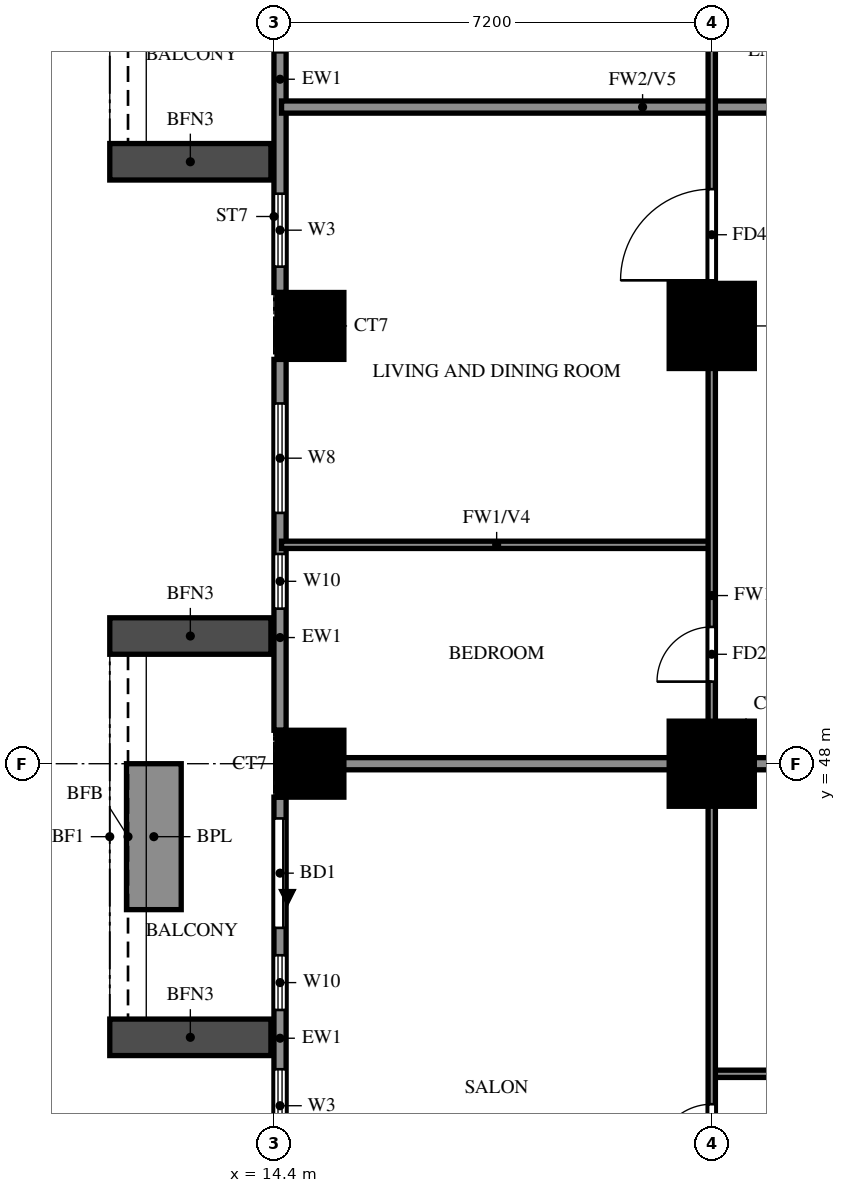
"""IFC4 building model, lengths in metres.
Left out: names, types, materials, properties, quantities, classifications, styles, units other than length and angle.
Written with IfcOpenShell. Run it as: python <this file> out.ifc"""

import sys

from ifc_helpers import new_model, si_unit, direction, frame, frame_2d, origin, origin_2d, place, context, subcontext, project, spatial, rectangle, extrude, source, transform, mapped, element, fill, save


model = new_model("IFC4")
c1 = context("Model", 3, precision=1e-05, world=origin(), true_north=direction((0.0, 1.0)))
c2 = subcontext(c1, "Body", "Model", "MODEL_VIEW")
j1 = project(units=[si_unit("LENGTHUNIT", "METRE"), si_unit("PLANEANGLEUNIT", "RADIAN")], contexts=[c1])
p1 = place(None, origin())
s1 = spatial("IfcSite", under=j1, at=p1, CompositionType="ELEMENT")
p2 = place(p1, origin())
s2 = spatial("IfcBuilding", under=s1, at=p2, CompositionType="ELEMENT")
p3 = place(p2, frame((0.0, 0.0, 44.5)))
s3 = spatial("IfcBuildingStorey", under=s2, at=p3, CompositionType="ELEMENT", Elevation=44.5)
m1 = source(origin(), c2, "Body", "SweptSolid", [
    extrude(rectangle(XDim=1.1, YDim=1.1, at=origin_2d()), origin(), (0.0, 0.0, 1.0), 3.18),
])
p4 = place(p3, frame((15.0, 48.0, 0.0), z_axis=(0.0, 0.0, 1.0), x_axis=(1.0, 0.0, 0.0)))
e1 = element("IfcColumn", 1, at=p4, inside=s3, PredefinedType="COLUMN", context=c2, shape_type="MappedRepresentation", body=[
    mapped(m1, transform((0.0, 0.0, 0.0))),
])
m2 = source(origin(), c2, "Body", "SweptSolid", [
    extrude(rectangle(XDim=1.4, YDim=1.4, at=origin_2d()), origin(), (0.0, 0.0, 1.0), 3.18),
])
p5 = place(p3, frame((21.6, 48.0, 0.0), z_axis=(0.0, 0.0, 1.0), x_axis=(1.0, 0.0, 0.0)))
e2 = element("IfcColumn", 2, at=p5, inside=s3, PredefinedType="COLUMN", context=c2, shape_type="MappedRepresentation", body=[
    mapped(m2, transform((0.0, 0.0, 0.0))),
])
p6 = place(p3, frame((15.0, 55.2, 0.0), z_axis=(0.0, 0.0, 1.0), x_axis=(1.0, 0.0, 0.0)))
e3 = element("IfcColumn", 3, at=p6, inside=s3, PredefinedType="COLUMN", context=c2, shape_type="MappedRepresentation", body=[
    mapped(m1, transform((0.0, 0.0, 0.0))),
])
p7 = place(p3, frame((21.6, 55.2, 0.0), z_axis=(0.0, 0.0, 1.0), x_axis=(1.0, 0.0, 0.0)))
e4 = element("IfcColumn", 4, at=p7, inside=s3, PredefinedType="COLUMN", context=c2, shape_type="MappedRepresentation", body=[
    mapped(m2, transform((0.0, 0.0, 0.0))),
])
p8 = place(p3, frame((14.5, 61.85, 0.0), z_axis=(0.0, 0.0, 1.0), x_axis=(0.0, -1.0, 0.0)))
e5 = element("IfcWall", 5, at=p8, inside=s3, PredefinedType="SOLIDWALL", context=c2, shape_type="SweptSolid", body=[
    extrude(rectangle(XDim=6.1, YDim=0.2, at=frame_2d((3.05, 0.0))), origin(), (0.0, 0.0, 1.0), 3.18),
])
p9 = place(p8, frame((0.35, 0.0, 0.0)))
e6 = element("IfcOpeningElement", 6, at=p9, cuts=e5, PredefinedType="OPENING", context=c2, shape_type="SweptSolid", body=[
    extrude(rectangle(XDim=1.8, YDim=2.4, at=frame_2d((0.9, 1.2))), frame((0.0, 0.11, 0.0), z_axis=(0.0, -1.0, 0.0), x_axis=(1.0, 0.0, 0.0)), (0.0, 0.0, 1.0), 0.22),
])
p10 = place(p8, frame((4.475, 0.0, 0.6)))
e7 = element("IfcOpeningElement", 7, at=p10, cuts=e5, PredefinedType="OPENING", context=c2, shape_type="SweptSolid", body=[
    extrude(rectangle(XDim=1.2, YDim=2.4, at=frame_2d((0.6, 1.2))), frame((0.0, 0.11, 0.0), z_axis=(0.0, -1.0, 0.0), x_axis=(1.0, 0.0, 0.0)), (0.0, 0.0, 1.0), 0.22),
])
p11 = place(p3, frame((14.5, 54.65, 0.0), z_axis=(0.0, 0.0, 1.0), x_axis=(0.0, -1.0, 0.0)))
e8 = element("IfcWall", 8, at=p11, inside=s3, PredefinedType="SOLIDWALL", context=c2, shape_type="SweptSolid", body=[
    extrude(rectangle(XDim=6.1, YDim=0.2, at=frame_2d((3.05, 0.0))), origin(), (0.0, 0.0, 1.0), 3.18),
])
p12 = place(p11, frame((3.2, 0.0, 0.6)))
e9 = element("IfcOpeningElement", 9, at=p12, cuts=e8, PredefinedType="OPENING", context=c2, shape_type="SweptSolid", body=[
    extrude(rectangle(XDim=0.9, YDim=2.4, at=frame_2d((0.45, 1.2))), frame((0.0, 0.11, 0.0), z_axis=(0.0, -1.0, 0.0), x_axis=(1.0, 0.0, 0.0)), (0.0, 0.0, 1.0), 0.22),
])
p13 = place(p11, frame((0.725, 0.0, 0.6)))
e10 = element("IfcOpeningElement", 10, at=p13, cuts=e8, PredefinedType="OPENING", context=c2, shape_type="SweptSolid", body=[
    extrude(rectangle(XDim=1.8, YDim=2.4, at=frame_2d((0.9, 1.2))), frame((0.0, 0.11, 0.0), z_axis=(0.0, -1.0, 0.0), x_axis=(1.0, 0.0, 0.0)), (0.0, 0.0, 1.0), 0.22),
])
p14 = place(p3, frame((14.5, 47.45, 0.0), z_axis=(0.0, 0.0, 1.0), x_axis=(0.0, -1.0, 0.0)))
e11 = element("IfcWall", 11, at=p14, inside=s3, PredefinedType="SOLIDWALL", context=c2, shape_type="SweptSolid", body=[
    extrude(rectangle(XDim=6.1, YDim=0.2, at=frame_2d((3.05, 0.0))), origin(), (0.0, 0.0, 1.0), 3.18),
])
p15 = place(p14, frame((0.35, 0.0, 0.0)))
e12 = element("IfcOpeningElement", 12, at=p15, cuts=e11, PredefinedType="OPENING", context=c2, shape_type="SweptSolid", body=[
    extrude(rectangle(XDim=1.8, YDim=2.4, at=frame_2d((0.9, 1.2))), frame((0.0, 0.11, 0.0), z_axis=(0.0, -1.0, 0.0), x_axis=(1.0, 0.0, 0.0)), (0.0, 0.0, 1.0), 0.22),
])
p16 = place(p14, frame((2.6, 0.0, 0.6)))
e13 = element("IfcOpeningElement", 13, at=p16, cuts=e11, PredefinedType="OPENING", context=c2, shape_type="SweptSolid", body=[
    extrude(rectangle(XDim=0.9, YDim=2.4, at=frame_2d((0.45, 1.2))), frame((0.0, 0.11, 0.0), z_axis=(0.0, -1.0, 0.0), x_axis=(1.0, 0.0, 0.0)), (0.0, 0.0, 1.0), 0.22),
])
p17 = place(p14, frame((4.475, 0.0, 0.6)))
e14 = element("IfcOpeningElement", 14, at=p17, cuts=e11, PredefinedType="OPENING", context=c2, shape_type="SweptSolid", body=[
    extrude(rectangle(XDim=1.2, YDim=2.4, at=frame_2d((0.6, 1.2))), frame((0.0, 0.11, 0.0), z_axis=(0.0, -1.0, 0.0), x_axis=(1.0, 0.0, 0.0)), (0.0, 0.0, 1.0), 0.22),
])
for number, where, z_axis, x_axis in (
    (15, (14.35, 57.9, 0.0), (0.0, 0.0, 1.0), (-1.0, 0.0, 0.0)),
    (16, (14.35, 50.1, 0.0), (0.0, 0.0, 1.0), (-1.0, 0.0, 0.0)),
    (17, (14.35, 43.5, 0.0), (0.0, 0.0, 1.0), (-1.0, 0.0, 0.0)),
):
    element("IfcWall", number, at=place(p3, frame(where, z_axis=z_axis, x_axis=x_axis)), inside=s3, PredefinedType="SOLIDWALL", context=c2, shape_type="SweptSolid", body=[
        extrude(rectangle(XDim=2.65, YDim=0.6, at=frame_2d((1.325, 0.0))), origin(), (0.0, 0.0, 1.0), 2.85),
    ])
p18 = place(p3, frame((12.425, 48.0, 0.0), z_axis=(0.0, 0.0, 1.0), x_axis=(0.0, -1.0, 0.0)))
e18 = element("IfcWall", 18, at=p18, inside=s3, PredefinedType="SOLIDWALL", context=c2, shape_type="SweptSolid", body=[
    extrude(rectangle(XDim=2.4, YDim=0.9, at=frame_2d((1.2, 0.0))), origin(), (0.0, 0.0, 1.0), 0.9),
])
p19 = place(p3, frame((14.525, 48.0, 0.0), z_axis=(0.0, 0.0, 1.0), x_axis=(1.0, 0.0, 0.0)))
e19 = element("IfcWall", 19, at=p19, inside=s3, PredefinedType="SOLIDWALL", context=c2, shape_type="SweptSolid", body=[
    extrude(rectangle(XDim=19.075, YDim=0.2, at=frame_2d((9.538, 0.0))), origin(), (0.0, 0.0, 1.0), 3.18),
])
p20 = place(p3, frame((14.525, 58.8, 0.0), z_axis=(0.0, 0.0, 1.0), x_axis=(1.0, 0.0, 0.0)))
e20 = element("IfcWall", 20, at=p20, inside=s3, PredefinedType="SOLIDWALL", context=c2, shape_type="SweptSolid", body=[
    extrude(rectangle(XDim=11.875, YDim=0.2, at=frame_2d((5.938, 0.0))), origin(), (0.0, 0.0, 1.0), 2.28),
])
p21 = place(p3, frame((21.6, 42.9, 0.0), z_axis=(0.0, 0.0, 1.0), x_axis=(1.0, 0.0, 0.0)))
e21 = element("IfcWall", 21, at=p21, inside=s3, PredefinedType="PARTITIONING", context=c2, shape_type="SweptSolid", body=[
    extrude(rectangle(XDim=14.4, YDim=0.12, at=frame_2d((7.2, 0.0))), origin(), (0.0, 0.0, 1.0), 3.18),
])
p22 = place(p21, frame((2.1, 0.0, 0.0)))
e22 = element("IfcOpeningElement", 22, at=p22, cuts=e21, PredefinedType="OPENING", context=c2, shape_type="SweptSolid", body=[
    extrude(rectangle(XDim=0.9, YDim=2.1, at=frame_2d((0.45, 1.05))), frame((0.0, 0.07, 0.0), z_axis=(0.0, -1.0, 0.0), x_axis=(1.0, 0.0, 0.0)), (0.0, 0.0, 1.0), 0.14),
])
p23 = place(p21, frame((5.85, 0.0, 0.0)))
e23 = element("IfcOpeningElement", 23, at=p23, cuts=e21, PredefinedType="OPENING", context=c2, shape_type="SweptSolid", body=[
    extrude(rectangle(XDim=0.8, YDim=2.1, at=frame_2d((0.4, 1.05))), frame((0.0, 0.07, 0.0), z_axis=(0.0, -1.0, 0.0), x_axis=(1.0, 0.0, 0.0)), (0.0, 0.0, 1.0), 0.14),
])
p24 = place(p21, frame((9.25, 0.0, 0.0)))
e24 = element("IfcOpeningElement", 24, at=p24, cuts=e21, PredefinedType="OPENING", context=c2, shape_type="SweptSolid", body=[
    extrude(rectangle(XDim=0.9, YDim=2.1, at=frame_2d((0.45, 1.05))), frame((0.0, 0.07, 0.0), z_axis=(0.0, -1.0, 0.0), x_axis=(1.0, 0.0, 0.0)), (0.0, 0.0, 1.0), 0.14),
])
p25 = place(p3, frame((14.525, 51.6, 0.0), z_axis=(0.0, 0.0, 1.0), x_axis=(1.0, 0.0, 0.0)))
e25 = element("IfcWall", 25, at=p25, inside=s3, PredefinedType="PARTITIONING", context=c2, shape_type="SweptSolid", body=[
    extrude(rectangle(XDim=7.075, YDim=0.12, at=frame_2d((3.538, 0.0))), origin(), (0.0, 0.0, 1.0), 2.28),
])
p26 = place(p3, frame((21.6, 33.725, 0.0), z_axis=(0.0, 0.0, 1.0), x_axis=(0.0, 1.0, 0.0)))
e26 = element("IfcWall", 26, at=p26, inside=s3, PredefinedType="PARTITIONING", context=c2, shape_type="SweptSolid", body=[
    extrude(rectangle(XDim=35.875, YDim=0.12, at=frame_2d((17.938, 0.0))), origin(), (0.0, 0.0, 1.0), 3.18),
])
p27 = place(p26, frame((7.775, 0.0, 0.0)))
e27 = element("IfcOpeningElement", 27, at=p27, cuts=e26, PredefinedType="OPENING", context=c2, shape_type="SweptSolid", body=[
    extrude(rectangle(XDim=0.9, YDim=2.1, at=frame_2d((0.45, 1.05))), frame((0.0, 0.07, 0.0), z_axis=(0.0, -1.0, 0.0), x_axis=(1.0, 0.0, 0.0)), (0.0, 0.0, 1.0), 0.14),
])
p28 = place(p26, frame((15.625, 0.0, 0.0)))
e28 = element("IfcOpeningElement", 28, at=p28, cuts=e26, PredefinedType="OPENING", context=c2, shape_type="SweptSolid", body=[
    extrude(rectangle(XDim=0.9, YDim=2.1, at=frame_2d((0.45, 1.05))), frame((0.0, 0.07, 0.0), z_axis=(0.0, -1.0, 0.0), x_axis=(1.0, 0.0, 0.0)), (0.0, 0.0, 1.0), 0.14),
])
p29 = place(p26, frame((22.225, 0.0, 0.0)))
e29 = element("IfcOpeningElement", 29, at=p29, cuts=e26, PredefinedType="OPENING", context=c2, shape_type="SweptSolid", body=[
    extrude(rectangle(XDim=1.5, YDim=2.1, at=frame_2d((0.75, 1.05))), frame((0.0, 0.07, 0.0), z_axis=(0.0, -1.0, 0.0), x_axis=(1.0, 0.0, 0.0)), (0.0, 0.0, 1.0), 0.14),
])
p30 = place(p26, frame((26.425, 0.0, 0.0)))
e30 = element("IfcOpeningElement", 30, at=p30, cuts=e26, PredefinedType="OPENING", context=c2, shape_type="SweptSolid", body=[
    extrude(rectangle(XDim=0.9, YDim=2.1, at=frame_2d((0.45, 1.05))), frame((0.0, 0.07, 0.0), z_axis=(0.0, -1.0, 0.0), x_axis=(1.0, 0.0, 0.0)), (0.0, 0.0, 1.0), 0.14),
])
p31 = place(p26, frame((31.825, 0.0, 0.0)))
e31 = element("IfcOpeningElement", 31, at=p31, cuts=e26, PredefinedType="OPENING", context=c2, shape_type="SweptSolid", body=[
    extrude(rectangle(XDim=0.9, YDim=2.1, at=frame_2d((0.45, 1.05))), frame((0.0, 0.07, 0.0), z_axis=(0.0, -1.0, 0.0), x_axis=(1.0, 0.0, 0.0)), (0.0, 0.0, 1.0), 0.14),
])
p32 = place(p10, origin())
e32 = element("IfcWindow", 32, at=p32, inside=s3, PartitioningType="SINGLE_PANEL", PredefinedType="WINDOW", context=c2, shape_type="SweptSolid", body=[
    extrude(rectangle(XDim=1.2, YDim=2.4, at=frame_2d((0.6, 1.2))), frame((0.0, 0.03, 0.0), z_axis=(0.0, -1.0, 0.0), x_axis=(1.0, 0.0, 0.0)), (0.0, 0.0, 1.0), 0.06),
])
fill(e7, e32)
p33 = place(p12, origin())
e33 = element("IfcWindow", 33, at=p33, inside=s3, PartitioningType="SINGLE_PANEL", PredefinedType="WINDOW", context=c2, shape_type="SweptSolid", body=[
    extrude(rectangle(XDim=0.9, YDim=2.4, at=frame_2d((0.45, 1.2))), frame((0.0, 0.03, 0.0), z_axis=(0.0, -1.0, 0.0), x_axis=(1.0, 0.0, 0.0)), (0.0, 0.0, 1.0), 0.06),
])
fill(e9, e33)
p34 = place(p13, origin())
e34 = element("IfcWindow", 34, at=p34, inside=s3, PartitioningType="DOUBLE_PANEL_VERTICAL", PredefinedType="WINDOW", context=c2, shape_type="SweptSolid", body=[
    extrude(rectangle(XDim=1.8, YDim=2.4, at=frame_2d((0.9, 1.2))), frame((0.0, 0.03, 0.0), z_axis=(0.0, -1.0, 0.0), x_axis=(1.0, 0.0, 0.0)), (0.0, 0.0, 1.0), 0.06),
])
fill(e10, e34)
p35 = place(p15, origin())
e35 = element("IfcDoor", 35, at=p35, inside=s3, OperationType="DOUBLE_DOOR_SLIDING", PredefinedType="DOOR", context=c2, shape_type="SweptSolid", body=[
    extrude(rectangle(XDim=1.8, YDim=2.4, at=frame_2d((0.9, 1.2))), frame((0.0, 0.025, 0.0), z_axis=(0.0, -1.0, 0.0), x_axis=(1.0, 0.0, 0.0)), (0.0, 0.0, 1.0), 0.05),
])
fill(e12, e35)
p36 = place(p16, origin())
e36 = element("IfcWindow", 36, at=p36, inside=s3, PartitioningType="SINGLE_PANEL", PredefinedType="WINDOW", context=c2, shape_type="SweptSolid", body=[
    extrude(rectangle(XDim=0.9, YDim=2.4, at=frame_2d((0.45, 1.2))), frame((0.0, 0.03, 0.0), z_axis=(0.0, -1.0, 0.0), x_axis=(1.0, 0.0, 0.0)), (0.0, 0.0, 1.0), 0.06),
])
fill(e13, e36)
p37 = place(p17, origin())
e37 = element("IfcWindow", 37, at=p37, inside=s3, PartitioningType="SINGLE_PANEL", PredefinedType="WINDOW", context=c2, shape_type="SweptSolid", body=[
    extrude(rectangle(XDim=1.2, YDim=2.4, at=frame_2d((0.6, 1.2))), frame((0.0, 0.03, 0.0), z_axis=(0.0, -1.0, 0.0), x_axis=(1.0, 0.0, 0.0)), (0.0, 0.0, 1.0), 0.06),
])
fill(e14, e37)
p38 = place(p27, origin())
e38 = element("IfcDoor", 38, at=p38, inside=s3, OperationType="SINGLE_SWING_RIGHT", PredefinedType="DOOR", context=c2, shape_type="SweptSolid", body=[
    extrude(rectangle(XDim=0.9, YDim=2.1, at=frame_2d((0.45, 1.05))), frame((0.0, 0.025, 0.0), z_axis=(0.0, -1.0, 0.0), x_axis=(1.0, 0.0, 0.0)), (0.0, 0.0, 1.0), 0.05),
])
fill(e27, e38)
p39 = place(p28, origin())
e39 = element("IfcDoor", 39, at=p39, inside=s3, OperationType="SINGLE_SWING_LEFT", PredefinedType="DOOR", context=c2, shape_type="SweptSolid", body=[
    extrude(rectangle(XDim=0.9, YDim=2.1, at=frame_2d((0.45, 1.05))), frame((0.0, 0.025, 0.0), z_axis=(0.0, -1.0, 0.0), x_axis=(1.0, 0.0, 0.0)), (0.0, 0.0, 1.0), 0.05),
])
fill(e28, e39)
p40 = place(p29, origin())
e40 = element("IfcDoor", 40, at=p40, inside=s3, OperationType="SINGLE_SWING_LEFT", PredefinedType="DOOR", context=c2, shape_type="SweptSolid", body=[
    extrude(rectangle(XDim=1.5, YDim=2.1, at=frame_2d((0.75, 1.05))), frame((0.0, 0.025, 0.0), z_axis=(0.0, -1.0, 0.0), x_axis=(1.0, 0.0, 0.0)), (0.0, 0.0, 1.0), 0.05),
])
fill(e29, e40)
save(model, sys.argv[1])
